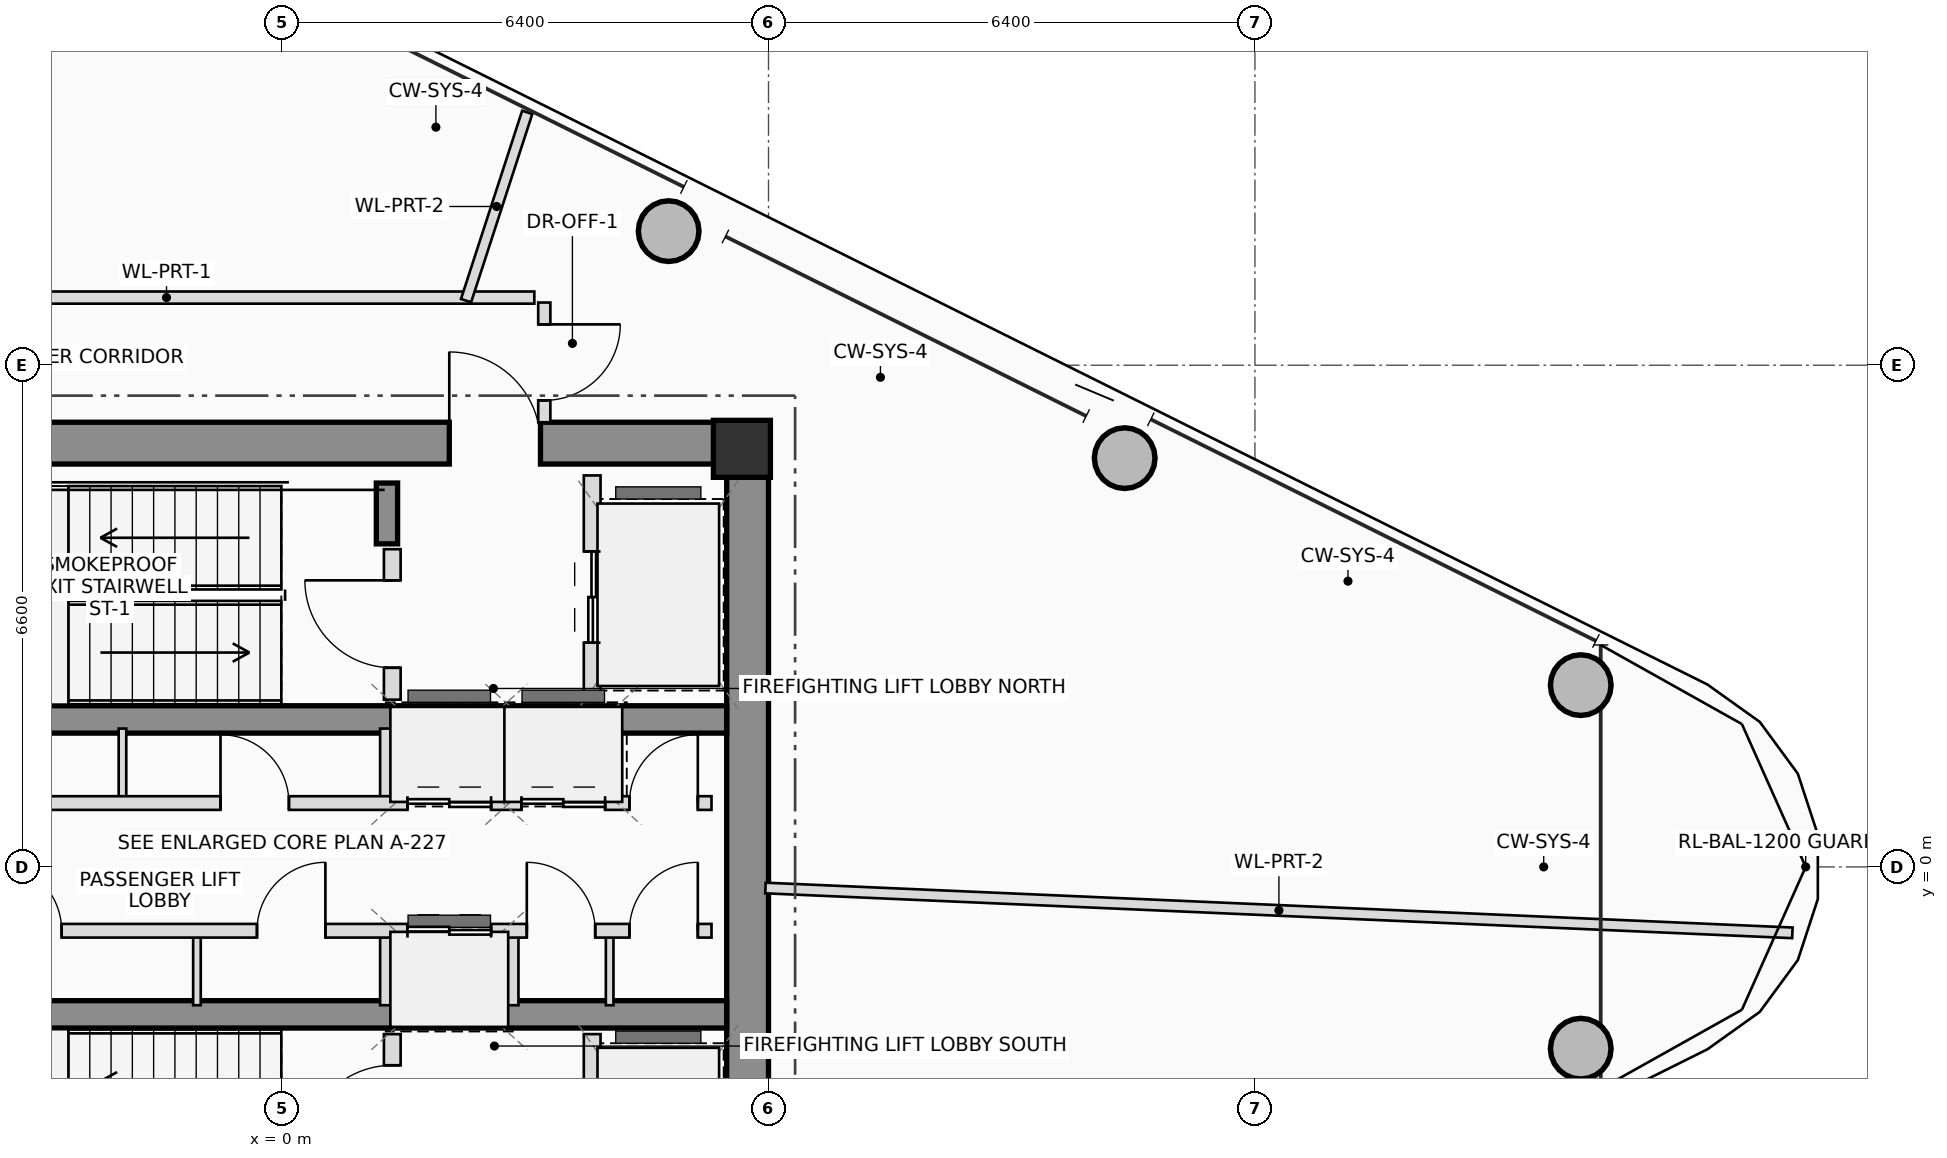
"""IFC4 building model, lengths in metres.
Left out: names, types, materials, properties, quantities, classifications, styles, units other than length and angle.
Written with IfcOpenShell. Run it as: python <this file> out.ifc"""

import sys

from ifc_helpers import new_model, si_unit, direction, frame, frame_2d, origin, origin_2d, place, context, subcontext, project, spatial, rectangle, hollow_circle, extrude, source, transform, mapped, element, fill, save


model = new_model("IFC4")
c1 = context("Model", 3, precision=1e-05, world=origin(), true_north=direction((0.0, 1.0)))
c2 = subcontext(c1, "Body", "Model", "MODEL_VIEW")
j1 = project(units=[si_unit("LENGTHUNIT", "METRE"), si_unit("PLANEANGLEUNIT", "RADIAN")], contexts=[c1])
p1 = place(None, origin())
s1 = spatial("IfcSite", under=j1, at=p1, CompositionType="ELEMENT")
p2 = place(p1, origin())
s2 = spatial("IfcBuilding", under=s1, at=p2, CompositionType="ELEMENT")
p3 = place(p2, frame((0.0, 0.0, 289.85)))
s3 = spatial("IfcBuildingStorey", under=s2, at=p3, CompositionType="ELEMENT", Elevation=289.85)
m1 = source(origin(), c2, "Body", "SweptSolid", [
    extrude(rectangle(XDim=0.75, YDim=0.75, at=origin_2d()), origin(), (0.0, 0.0, 1.0), 3.45),
])
p4 = place(p3, frame((6.05, 5.5, 0.0), z_axis=(0.0, 0.0, 1.0), x_axis=(1.0, 0.0, 0.0)))
e1 = element("IfcColumn", 1, at=p4, inside=s3, PredefinedType="COLUMN", context=c2, shape_type="MappedRepresentation", body=[
    mapped(m1, transform((0.0, 0.0, 0.0), scale=1.0)),
])
p5 = place(p3, frame((-6.4, 5.575, 0.0), z_axis=(0.0, 0.0, 1.0), x_axis=(1.0, 0.0, 0.0)))
e2 = element("IfcWall", 2, at=p5, inside=s3, PredefinedType="SHEAR", context=c2, shape_type="SweptSolid", body=[
    extrude(rectangle(XDim=12.8, YDim=0.55, at=frame_2d((6.4, 0.0))), origin(), (0.0, 0.0, 1.0), 3.45),
])
p6 = place(p5, frame((8.6, 0.0, 0.0)))
e3 = element("IfcOpeningElement", 3, at=p6, cuts=e2, PredefinedType="OPENING", context=c2, shape_type="SweptSolid", body=[
    extrude(rectangle(XDim=1.2, YDim=2.2, at=frame_2d((0.6, 1.1))), frame((0.0, 0.285, 0.0), z_axis=(0.0, -1.0, 0.0), x_axis=(1.0, 0.0, 0.0)), (0.0, 0.0, 1.0), 0.57),
])
p7 = place(p3, frame((6.125, -5.3, 0.0), z_axis=(0.0, 0.0, 1.0), x_axis=(0.0, 1.0, 0.0)))
e4 = element("IfcWall", 4, at=p7, inside=s3, PredefinedType="SHEAR", context=c2, shape_type="SweptSolid", body=[
    extrude(rectangle(XDim=10.6, YDim=0.55, at=frame_2d((5.3, 0.0))), origin(), (0.0, 0.0, 1.0), 3.45),
])
for number, where, z_axis, x_axis in (
    (5, (-5.85, 1.94, 0.0), (0.0, 0.0, 1.0), (1.0, 0.0, 0.0)),
    (6, (-5.85, -1.94, 0.0), (0.0, 0.0, 1.0), (1.0, 0.0, 0.0)),
):
    element("IfcWall", number, at=place(p3, frame(where, z_axis=z_axis, x_axis=x_axis)), inside=s3, PredefinedType="SHEAR", context=c2, shape_type="SweptSolid", body=[
        extrude(rectangle(XDim=11.7, YDim=0.36, at=frame_2d((5.85, 0.0))), origin(), (0.0, 0.0, 1.0), 3.45),
    ])
p8 = place(p3, frame((1.38, 4.25, 0.0), z_axis=(0.0, 0.0, 1.0), x_axis=(0.0, 1.0, 0.0)))
e7 = element("IfcWall", 7, at=p8, inside=s3, PredefinedType="SHEAR", context=c2, shape_type="SweptSolid", body=[
    extrude(rectangle(XDim=0.8, YDim=0.28, at=frame_2d((0.4, 0.0))), origin(), (0.0, 0.0, 1.0), 3.45),
])
m2 = source(origin(), c2, "Body", "SweptSolid", [
    extrude(hollow_circle(Radius=0.4, WallThickness=0.028, at=origin_2d()), origin(), (0.0, 0.0, 1.0), 3.45),
])
for number, where, z_axis, x_axis in (
    (8, (17.087, -2.392, 0.0), (0.0, 0.0, 1.0), (1.0, 0.0, 0.0)),
    (9, (17.087, 2.392, 0.0), (0.0, 0.0, 1.0), (1.0, 0.0, 0.0)),
    (10, (11.086, 5.378, 0.0), (0.0, 0.0, 1.0), (1.0, 0.0, 0.0)),
    (11, (5.086, 8.364, 0.0), (0.0, 0.0, 1.0), (1.0, 0.0, 0.0)),
):
    element("IfcColumn", number, at=place(p3, frame(where, z_axis=z_axis, x_axis=x_axis)), inside=s3, PredefinedType="COLUMN", context=c2, shape_type="MappedRepresentation", body=[
        mapped(m2, transform((0.0, 0.0, 0.0), scale=1.0)),
    ])
p9 = place(p3, frame((1.45, 2.2, 0.0), z_axis=(0.0, 0.0, 1.0), x_axis=(0.0, 1.0, 0.0)))
e12 = element("IfcWall", 12, at=p9, inside=s3, PredefinedType="PLUMBINGWALL", context=c2, shape_type="SweptSolid", body=[
    extrude(rectangle(XDim=1.98, YDim=0.22, at=frame_2d((0.99, 0.0))), origin(), (0.0, 0.0, 1.0), 3.25),
])
p10 = place(p9, frame((0.42, 0.0, 0.0)))
e13 = element("IfcOpeningElement", 13, at=p10, cuts=e12, PredefinedType="OPENING", context=c2, shape_type="SweptSolid", body=[
    extrude(rectangle(XDim=1.15, YDim=2.15, at=frame_2d((0.575, 1.075))), frame((0.0, 0.12, 0.0), z_axis=(0.0, -1.0, 0.0), x_axis=(1.0, 0.0, 0.0)), (0.0, 0.0, 1.0), 0.24),
])
p11 = place(p3, frame((4.08, 2.2, 0.0), z_axis=(0.0, 0.0, 1.0), x_axis=(0.0, 1.0, 0.0)))
e14 = element("IfcWall", 14, at=p11, inside=s3, PredefinedType="PLUMBINGWALL", context=c2, shape_type="SweptSolid", body=[
    extrude(rectangle(XDim=2.95, YDim=0.22, at=frame_2d((1.475, 0.0))), origin(), (0.0, 0.0, 1.0), 3.25),
])
p12 = place(p11, frame((0.75, 0.0, 0.0)))
e15 = element("IfcOpeningElement", 15, at=p12, cuts=e14, PredefinedType="OPENING", context=c2, shape_type="SweptSolid", body=[
    extrude(rectangle(XDim=1.2, YDim=2.25, at=frame_2d((0.6, 1.125))), frame((0.0, 0.12, 0.0), z_axis=(0.0, -1.0, 0.0), x_axis=(1.0, 0.0, 0.0)), (0.0, 0.0, 1.0), 0.24),
])
p13 = place(p3, frame((1.45, -4.18, 0.0), z_axis=(0.0, 0.0, 1.0), x_axis=(0.0, 1.0, 0.0)))
e16 = element("IfcWall", 16, at=p13, inside=s3, PredefinedType="PLUMBINGWALL", context=c2, shape_type="SweptSolid", body=[
    extrude(rectangle(XDim=1.98, YDim=0.22, at=frame_2d((0.99, 0.0))), origin(), (0.0, 0.0, 1.0), 3.25),
])
p14 = place(p13, frame((0.42, 0.0, 0.0)))
e17 = element("IfcOpeningElement", 17, at=p14, cuts=e16, PredefinedType="OPENING", context=c2, shape_type="SweptSolid", body=[
    extrude(rectangle(XDim=1.15, YDim=2.15, at=frame_2d((0.575, 1.075))), frame((0.0, 0.12, 0.0), z_axis=(0.0, -1.0, 0.0), x_axis=(1.0, 0.0, 0.0)), (0.0, 0.0, 1.0), 0.24),
])
p15 = place(p3, frame((4.08, -5.15, 0.0), z_axis=(0.0, 0.0, 1.0), x_axis=(0.0, 1.0, 0.0)))
e18 = element("IfcWall", 18, at=p15, inside=s3, PredefinedType="PLUMBINGWALL", context=c2, shape_type="SweptSolid", body=[
    extrude(rectangle(XDim=2.95, YDim=0.22, at=frame_2d((1.475, 0.0))), origin(), (0.0, 0.0, 1.0), 3.25),
])
p16 = place(p15, frame((0.95, 0.0, 0.0)))
e19 = element("IfcOpeningElement", 19, at=p16, cuts=e18, PredefinedType="OPENING", context=c2, shape_type="SweptSolid", body=[
    extrude(rectangle(XDim=1.2, YDim=2.25, at=frame_2d((0.6, 1.125))), frame((0.0, 0.12, 0.0), z_axis=(0.0, -1.0, 0.0), x_axis=(1.0, 0.0, 0.0)), (0.0, 0.0, 1.0), 0.24),
])
for number, where, z_axis, x_axis in (
    (20, (-2.1, 0.84, 0.0), (0.0, 0.0, 1.0), (0.0, 1.0, 0.0)),
    (21, (-1.12, -1.82, 0.0), (0.0, 0.0, 1.0), (0.0, 1.0, 0.0)),
):
    element("IfcWall", number, at=place(p3, frame(where, z_axis=z_axis, x_axis=x_axis)), inside=s3, PredefinedType="PARTITIONING", context=c2, shape_type="SweptSolid", body=[
        extrude(rectangle(XDim=0.98, YDim=0.1, at=frame_2d((0.49, 0.0))), origin(), (0.0, 0.0, 1.0), 3.25),
    ])
for number, where, z_axis, x_axis in (
    (22, (1.38, 0.84, 0.0), (0.0, 0.0, 1.0), (0.0, 1.0, 0.0)),
    (23, (1.38, -1.82, 0.0), (0.0, 0.0, 1.0), (0.0, 1.0, 0.0)),
    (24, (3.02, 0.84, 0.0), (0.0, 0.0, 1.0), (0.0, 1.0, 0.0)),
    (25, (4.38, 0.84, 0.0), (0.0, 0.0, 1.0), (0.0, 1.0, 0.0)),
    (26, (3.02, -1.82, 0.0), (0.0, 0.0, 1.0), (0.0, 1.0, 0.0)),
):
    element("IfcWall", number, at=place(p3, frame(where, z_axis=z_axis, x_axis=x_axis)), inside=s3, PredefinedType="PLUMBINGWALL", context=c2, shape_type="SweptSolid", body=[
        extrude(rectangle(XDim=0.98, YDim=0.18, at=frame_2d((0.49, 0.0))), origin(), (0.0, 0.0, 1.0), 3.25),
    ])
p17 = place(p3, frame((4.31, -1.82, 0.0), z_axis=(0.0, 0.0, 1.0), x_axis=(0.0, 1.0, 0.0)))
e27 = element("IfcWall", 27, at=p17, inside=s3, PredefinedType="PARTITIONING", context=c2, shape_type="SweptSolid", body=[
    extrude(rectangle(XDim=0.98, YDim=0.1, at=frame_2d((0.49, 0.0))), origin(), (0.0, 0.0, 1.0), 3.25),
])
p18 = place(p3, frame((-5.68, 0.84, 0.0), z_axis=(0.0, 0.0, 1.0), x_axis=(1.0, 0.0, 0.0)))
e28 = element("IfcWall", 28, at=p18, inside=s3, PredefinedType="PLUMBINGWALL", context=c2, shape_type="SweptSolid", body=[
    extrude(rectangle(XDim=11.33, YDim=0.18, at=frame_2d((5.665, 0.0))), origin(), (0.0, 0.0, 1.0), 3.25),
])
p19 = place(p18, frame((1.39, 0.0, 0.0)))
e29 = element("IfcOpeningElement", 29, at=p19, cuts=e28, PredefinedType="OPENING", context=c2, shape_type="SweptSolid", body=[
    extrude(rectangle(XDim=0.92, YDim=2.1, at=frame_2d((0.46, 1.05))), frame((0.0, 0.1, 0.0), z_axis=(0.0, -1.0, 0.0), x_axis=(1.0, 0.0, 0.0)), (0.0, 0.0, 1.0), 0.2),
])
p20 = place(p18, frame((4.87, 0.0, 0.0)))
e30 = element("IfcOpeningElement", 30, at=p20, cuts=e28, PredefinedType="OPENING", context=c2, shape_type="SweptSolid", body=[
    extrude(rectangle(XDim=0.9, YDim=2.05, at=frame_2d((0.45, 1.025))), frame((0.0, 0.1, 0.0), z_axis=(0.0, -1.0, 0.0), x_axis=(1.0, 0.0, 0.0)), (0.0, 0.0, 1.0), 0.2),
])
p21 = place(p18, frame((7.33, 0.0, 0.0)))
e31 = element("IfcOpeningElement", 31, at=p21, cuts=e28, PredefinedType="OPENING", context=c2, shape_type="SweptSolid", body=[
    extrude(rectangle(XDim=1.1, YDim=2.2, at=frame_2d((0.55, 1.1))), frame((0.0, 0.1, 0.0), z_axis=(0.0, -1.0, 0.0), x_axis=(1.0, 0.0, 0.0)), (0.0, 0.0, 1.0), 0.2),
])
p22 = place(p18, frame((8.83, 0.0, 0.0)))
e32 = element("IfcOpeningElement", 32, at=p22, cuts=e28, PredefinedType="OPENING", context=c2, shape_type="SweptSolid", body=[
    extrude(rectangle(XDim=1.1, YDim=2.2, at=frame_2d((0.55, 1.1))), frame((0.0, 0.1, 0.0), z_axis=(0.0, -1.0, 0.0), x_axis=(1.0, 0.0, 0.0)), (0.0, 0.0, 1.0), 0.2),
])
p23 = place(p18, frame((10.25, 0.0, 0.0)))
e33 = element("IfcOpeningElement", 33, at=p23, cuts=e28, PredefinedType="OPENING", context=c2, shape_type="SweptSolid", body=[
    extrude(rectangle(XDim=0.9, YDim=2.05, at=frame_2d((0.45, 1.025))), frame((0.0, 0.1, 0.0), z_axis=(0.0, -1.0, 0.0), x_axis=(1.0, 0.0, 0.0)), (0.0, 0.0, 1.0), 0.2),
])
p24 = place(p3, frame((-5.68, -0.84, 0.0), z_axis=(0.0, 0.0, 1.0), x_axis=(1.0, 0.0, 0.0)))
e34 = element("IfcWall", 34, at=p24, inside=s3, PredefinedType="PLUMBINGWALL", context=c2, shape_type="SweptSolid", body=[
    extrude(rectangle(XDim=11.33, YDim=0.18, at=frame_2d((5.665, 0.0))), origin(), (0.0, 0.0, 1.0), 3.25),
])
p25 = place(p24, frame((1.88, 0.0, 0.0)))
e35 = element("IfcOpeningElement", 35, at=p25, cuts=e34, PredefinedType="OPENING", context=c2, shape_type="SweptSolid", body=[
    extrude(rectangle(XDim=0.9, YDim=2.05, at=frame_2d((0.45, 1.025))), frame((0.0, 0.1, 0.0), z_axis=(0.0, -1.0, 0.0), x_axis=(1.0, 0.0, 0.0)), (0.0, 0.0, 1.0), 0.2),
])
p26 = place(p24, frame((5.35, 0.0, 0.0)))
e36 = element("IfcOpeningElement", 36, at=p26, cuts=e34, PredefinedType="OPENING", context=c2, shape_type="SweptSolid", body=[
    extrude(rectangle(XDim=0.9, YDim=2.05, at=frame_2d((0.45, 1.025))), frame((0.0, 0.1, 0.0), z_axis=(0.0, -1.0, 0.0), x_axis=(1.0, 0.0, 0.0)), (0.0, 0.0, 1.0), 0.2),
])
p27 = place(p24, frame((7.33, 0.0, 0.0)))
e37 = element("IfcOpeningElement", 37, at=p27, cuts=e34, PredefinedType="OPENING", context=c2, shape_type="SweptSolid", body=[
    extrude(rectangle(XDim=1.1, YDim=2.2, at=frame_2d((0.55, 1.1))), frame((0.0, 0.1, 0.0), z_axis=(0.0, -1.0, 0.0), x_axis=(1.0, 0.0, 0.0)), (0.0, 0.0, 1.0), 0.2),
])
p28 = place(p24, frame((8.9, 0.0, 0.0)))
e38 = element("IfcOpeningElement", 38, at=p28, cuts=e34, PredefinedType="OPENING", context=c2, shape_type="SweptSolid", body=[
    extrude(rectangle(XDim=0.9, YDim=2.05, at=frame_2d((0.45, 1.025))), frame((0.0, 0.1, 0.0), z_axis=(0.0, -1.0, 0.0), x_axis=(1.0, 0.0, 0.0)), (0.0, 0.0, 1.0), 0.2),
])
p29 = place(p24, frame((10.25, 0.0, 0.0)))
e39 = element("IfcOpeningElement", 39, at=p29, cuts=e34, PredefinedType="OPENING", context=c2, shape_type="SweptSolid", body=[
    extrude(rectangle(XDim=0.9, YDim=2.05, at=frame_2d((0.45, 1.025))), frame((0.0, 0.1, 0.0), z_axis=(0.0, -1.0, 0.0), x_axis=(1.0, 0.0, 0.0)), (0.0, 0.0, 1.0), 0.2),
])
p30 = place(p3, frame((-6.36, 7.49, 0.0), z_axis=(0.0, 0.0, 1.0), x_axis=(1.0, 0.0, 0.0)))
e40 = element("IfcWall", 40, at=p30, inside=s3, PredefinedType="PARTITIONING", context=c2, shape_type="SweptSolid", body=[
    extrude(rectangle(XDim=9.679, YDim=0.16, at=frame_2d((4.84, 0.0))), origin(), (0.0, 0.0, 1.0), 2.655),
])
p31 = place(p3, frame((3.45, 7.425, 0.0), z_axis=(0.0, 0.0, 1.0), x_axis=(0.0, -1.0, 0.0)))
e41 = element("IfcWall", 41, at=p31, inside=s3, PredefinedType="PARTITIONING", context=c2, shape_type="SweptSolid", body=[
    extrude(rectangle(XDim=1.575, YDim=0.16, at=frame_2d((0.787, 0.0))), origin(), (0.0, 0.0, 1.0), 2.855),
])
p32 = place(p31, frame((0.287, 0.0, 0.0)))
e42 = element("IfcOpeningElement", 42, at=p32, cuts=e41, PredefinedType="OPENING", context=c2, shape_type="SweptSolid", body=[
    extrude(rectangle(XDim=1.0, YDim=2.25, at=frame_2d((0.5, 1.125))), frame((0.0, 0.09, 0.0), z_axis=(0.0, -1.0, 0.0), x_axis=(1.0, 0.0, 0.0)), (0.0, 0.0, 1.0), 0.18),
])
p33 = place(p3, frame((6.36, -0.278, 0.0), z_axis=(0.0, 0.0, 1.0), x_axis=(0.999047623791, -0.043633076864, 0.0)))
e43 = element("IfcWall", 43, at=p33, inside=s3, PredefinedType="PARTITIONING", context=c2, shape_type="SweptSolid", body=[
    extrude(rectangle(XDim=13.524, YDim=0.14, at=frame_2d((6.762, 0.0))), origin(), (0.0, 0.0, 1.0), 2.815),
])
p34 = place(p3, frame((2.421, 7.45, 0.0), z_axis=(0.0, 0.0, 1.0), x_axis=(0.309047920595, 0.951046467201, 0.0)))
e44 = element("IfcWall", 44, at=p34, inside=s3, PredefinedType="PARTITIONING", context=c2, shape_type="SweptSolid", body=[
    extrude(rectangle(XDim=2.604, YDim=0.14, at=frame_2d((1.302, 0.0))), origin(), (0.0, 0.0, 1.0), 2.815),
])
p35 = place(p6, origin())
e45 = element("IfcDoor", 45, at=p35, inside=s3, OperationType="SINGLE_SWING_LEFT", PredefinedType="DOOR", context=c2, shape_type="SweptSolid", body=[
    extrude(rectangle(XDim=1.2, YDim=2.2, at=frame_2d((0.6, 1.1))), frame((0.0, 0.025, 0.0), z_axis=(0.0, -1.0, 0.0), x_axis=(1.0, 0.0, 0.0)), (0.0, 0.0, 1.0), 0.05),
])
fill(e3, e45)
p36 = place(p10, origin())
e46 = element("IfcDoor", 46, at=p36, inside=s3, OperationType="SINGLE_SWING_RIGHT", PredefinedType="DOOR", context=c2, shape_type="SweptSolid", body=[
    extrude(rectangle(XDim=1.15, YDim=2.15, at=frame_2d((0.575, 1.075))), frame((0.0, 0.025, 0.0), z_axis=(0.0, -1.0, 0.0), x_axis=(1.0, 0.0, 0.0)), (0.0, 0.0, 1.0), 0.05),
])
fill(e13, e46)
p37 = place(p12, origin())
e47 = element("IfcDoor", 47, at=p37, inside=s3, OperationType="DOUBLE_DOOR_SLIDING", PredefinedType="DOOR", context=c2, shape_type="SweptSolid", body=[
    extrude(rectangle(XDim=1.2, YDim=2.25, at=frame_2d((0.6, 1.125))), frame((0.0, 0.025, 0.0), z_axis=(0.0, -1.0, 0.0), x_axis=(1.0, 0.0, 0.0)), (0.0, 0.0, 1.0), 0.05),
])
fill(e15, e47)
p38 = place(p14, origin())
e48 = element("IfcDoor", 48, at=p38, inside=s3, OperationType="SINGLE_SWING_LEFT", PredefinedType="DOOR", context=c2, shape_type="SweptSolid", body=[
    extrude(rectangle(XDim=1.15, YDim=2.15, at=frame_2d((0.575, 1.075))), frame((0.0, 0.025, 0.0), z_axis=(0.0, -1.0, 0.0), x_axis=(1.0, 0.0, 0.0)), (0.0, 0.0, 1.0), 0.05),
])
fill(e17, e48)
p39 = place(p20, origin())
e49 = element("IfcDoor", 49, at=p39, inside=s3, OperationType="SINGLE_SWING_LEFT", PredefinedType="DOOR", context=c2, shape_type="SweptSolid", body=[
    extrude(rectangle(XDim=0.9, YDim=2.05, at=frame_2d((0.45, 1.025))), frame((0.0, 0.025, 0.0), z_axis=(0.0, -1.0, 0.0), x_axis=(1.0, 0.0, 0.0)), (0.0, 0.0, 1.0), 0.05),
])
fill(e30, e49)
p40 = place(p21, origin())
e50 = element("IfcDoor", 50, at=p40, inside=s3, OperationType="DOUBLE_DOOR_SLIDING", PredefinedType="DOOR", context=c2, shape_type="SweptSolid", body=[
    extrude(rectangle(XDim=1.1, YDim=2.2, at=frame_2d((0.55, 1.1))), frame((0.0, 0.025, 0.0), z_axis=(0.0, -1.0, 0.0), x_axis=(1.0, 0.0, 0.0)), (0.0, 0.0, 1.0), 0.05),
])
fill(e31, e50)
p41 = place(p22, origin())
e51 = element("IfcDoor", 51, at=p41, inside=s3, OperationType="DOUBLE_DOOR_SLIDING", PredefinedType="DOOR", context=c2, shape_type="SweptSolid", body=[
    extrude(rectangle(XDim=1.1, YDim=2.2, at=frame_2d((0.55, 1.1))), frame((0.0, 0.025, 0.0), z_axis=(0.0, -1.0, 0.0), x_axis=(1.0, 0.0, 0.0)), (0.0, 0.0, 1.0), 0.05),
])
fill(e32, e51)
p42 = place(p23, origin())
e52 = element("IfcDoor", 52, at=p42, inside=s3, OperationType="SINGLE_SWING_RIGHT", PredefinedType="DOOR", context=c2, shape_type="SweptSolid", body=[
    extrude(rectangle(XDim=0.9, YDim=2.05, at=frame_2d((0.45, 1.025))), frame((0.0, 0.025, 0.0), z_axis=(0.0, -1.0, 0.0), x_axis=(1.0, 0.0, 0.0)), (0.0, 0.0, 1.0), 0.05),
])
fill(e33, e52)
p43 = place(p25, origin())
e53 = element("IfcDoor", 53, at=p43, inside=s3, OperationType="SINGLE_SWING_LEFT", PredefinedType="DOOR", context=c2, shape_type="SweptSolid", body=[
    extrude(rectangle(XDim=0.9, YDim=2.05, at=frame_2d((0.45, 1.025))), frame((0.0, 0.025, 0.0), z_axis=(0.0, -1.0, 0.0), x_axis=(1.0, 0.0, 0.0)), (0.0, 0.0, 1.0), 0.05),
])
fill(e35, e53)
p44 = place(p26, origin())
e54 = element("IfcDoor", 54, at=p44, inside=s3, OperationType="SINGLE_SWING_RIGHT", PredefinedType="DOOR", context=c2, shape_type="SweptSolid", body=[
    extrude(rectangle(XDim=0.9, YDim=2.05, at=frame_2d((0.45, 1.025))), frame((0.0, 0.025, 0.0), z_axis=(0.0, -1.0, 0.0), x_axis=(1.0, 0.0, 0.0)), (0.0, 0.0, 1.0), 0.05),
])
fill(e36, e54)
p45 = place(p27, origin())
e55 = element("IfcDoor", 55, at=p45, inside=s3, OperationType="DOUBLE_DOOR_SLIDING", PredefinedType="DOOR", context=c2, shape_type="SweptSolid", body=[
    extrude(rectangle(XDim=1.1, YDim=2.2, at=frame_2d((0.55, 1.1))), frame((0.0, 0.025, 0.0), z_axis=(0.0, -1.0, 0.0), x_axis=(1.0, 0.0, 0.0)), (0.0, 0.0, 1.0), 0.05),
])
fill(e37, e55)
p46 = place(p28, origin())
e56 = element("IfcDoor", 56, at=p46, inside=s3, OperationType="SINGLE_SWING_LEFT", PredefinedType="DOOR", context=c2, shape_type="SweptSolid", body=[
    extrude(rectangle(XDim=0.9, YDim=2.05, at=frame_2d((0.45, 1.025))), frame((0.0, 0.025, 0.0), z_axis=(0.0, -1.0, 0.0), x_axis=(1.0, 0.0, 0.0)), (0.0, 0.0, 1.0), 0.05),
])
fill(e38, e56)
p47 = place(p29, origin())
e57 = element("IfcDoor", 57, at=p47, inside=s3, OperationType="SINGLE_SWING_RIGHT", PredefinedType="DOOR", context=c2, shape_type="SweptSolid", body=[
    extrude(rectangle(XDim=0.9, YDim=2.05, at=frame_2d((0.45, 1.025))), frame((0.0, 0.025, 0.0), z_axis=(0.0, -1.0, 0.0), x_axis=(1.0, 0.0, 0.0)), (0.0, 0.0, 1.0), 0.05),
])
fill(e39, e57)
p48 = place(p32, origin())
e58 = element("IfcDoor", 58, at=p48, inside=s3, OperationType="SINGLE_SWING_LEFT", PredefinedType="DOOR", context=c2, shape_type="SweptSolid", body=[
    extrude(rectangle(XDim=1.0, YDim=2.25, at=frame_2d((0.5, 1.125))), frame((0.0, 0.025, 0.0), z_axis=(0.0, -1.0, 0.0), x_axis=(1.0, 0.0, 0.0)), (0.0, 0.0, 1.0), 0.05),
])
fill(e42, e58)
save(model, sys.argv[1])
